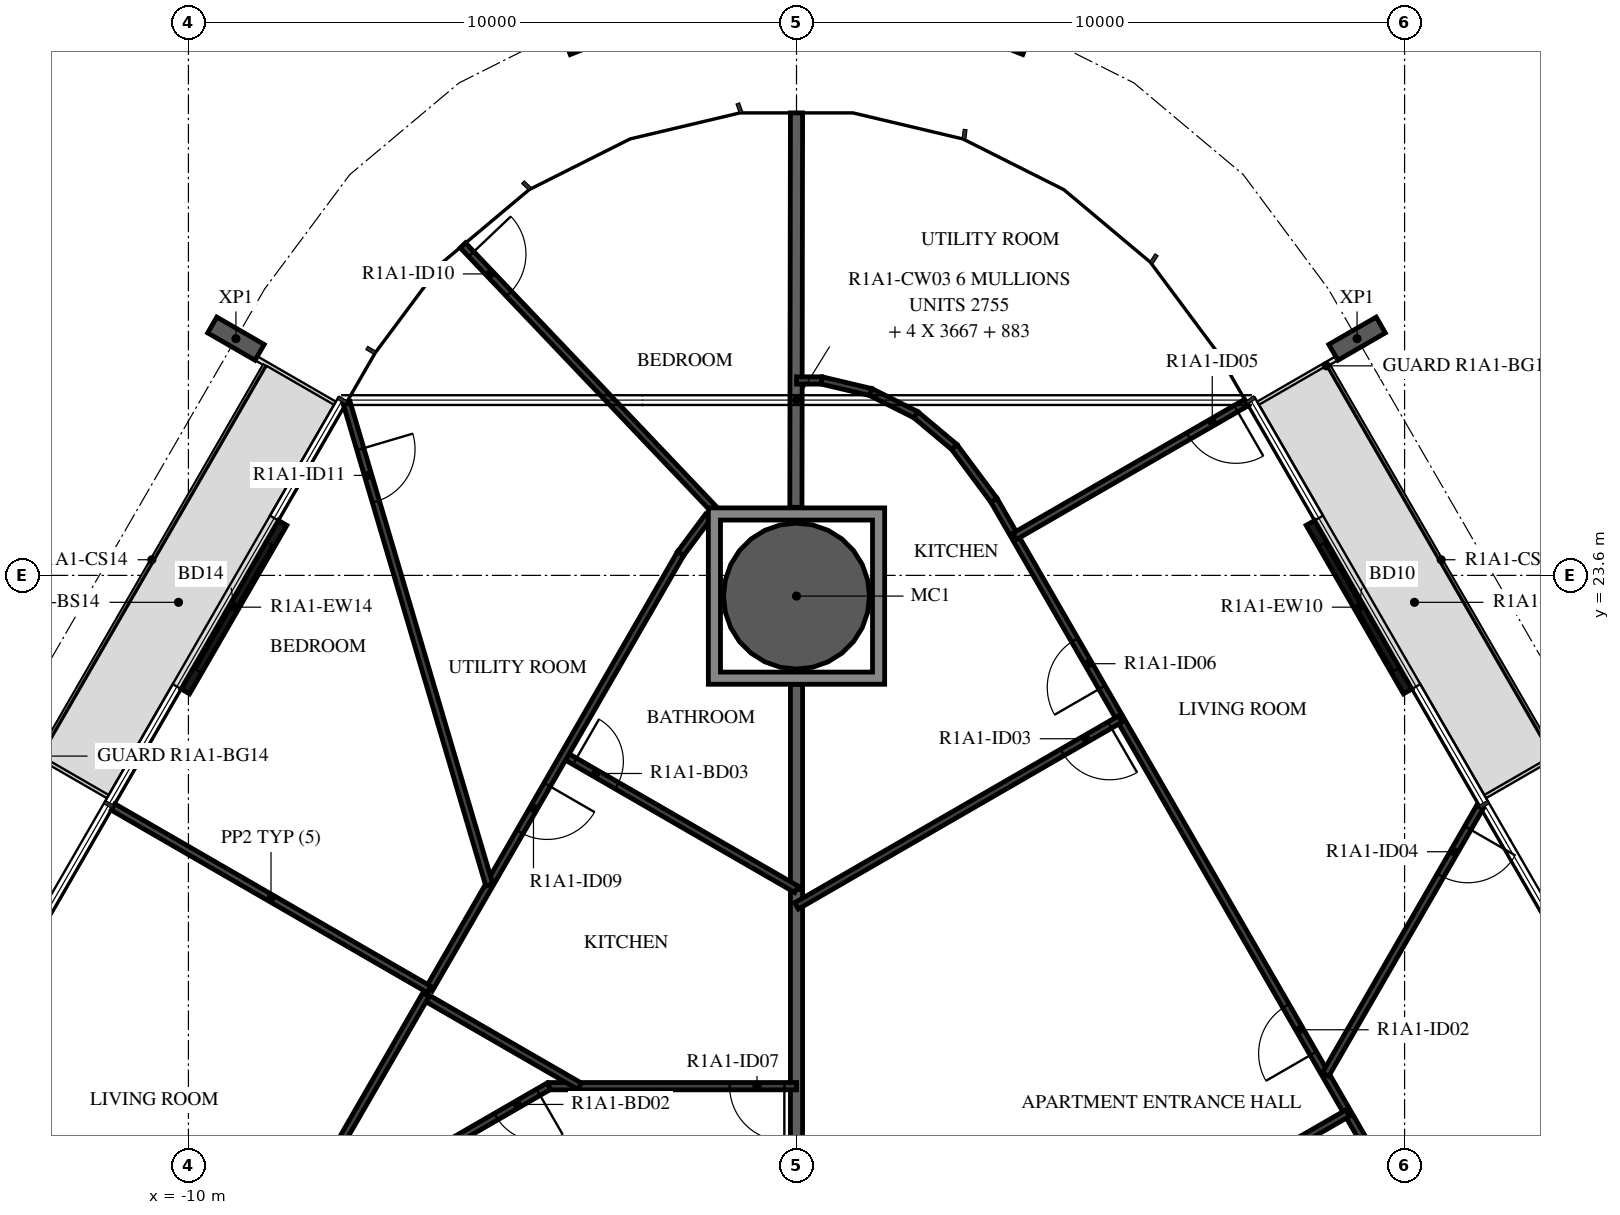
"""IFC4 building model, lengths in metres.
Left out: names, types, materials, properties, quantities, classifications, styles, units other than length and angle.
Written with IfcOpenShell. Run it as: python <this file> out.ifc"""

import sys

from ifc_helpers import new_model, si_unit, direction, frame, frame_2d, origin, origin_2d, place, context, subcontext, project, spatial, polyline, rectangle, hollow_circle, i_section, outline, extrude, element, fill, save


model = new_model("IFC4")
c1 = context("Model", 3, precision=1e-05, world=origin(), true_north=direction((0.0, 1.0)))
c2 = subcontext(c1, "Body", "Model", "MODEL_VIEW")
j1 = project(units=[si_unit("LENGTHUNIT", "METRE"), si_unit("PLANEANGLEUNIT", "RADIAN")], contexts=[c1])
p1 = place(None, origin())
s1 = spatial("IfcSite", under=j1, at=p1, CompositionType="ELEMENT")
p2 = place(p1, origin())
s2 = spatial("IfcBuilding", under=s1, at=p2, CompositionType="ELEMENT")
p3 = place(p2, frame((0.0, 0.0, 41.9)))
s3 = spatial("IfcBuildingStorey", under=s2, at=p3, CompositionType="ELEMENT", Elevation=41.9)
p4 = place(p3, frame((0.0, 23.26, -0.38), z_axis=(0.0, 0.0, 1.0), x_axis=(1.0, 0.0, 0.0)))
e1 = element("IfcColumn", 1, at=p4, inside=s3, PredefinedType="COLUMN", context=c2, shape_type="SweptSolid", body=[
    extrude(hollow_circle(Radius=1.2, WallThickness=0.06, at=origin_2d()), origin(), (0.0, 0.0, 1.0), 3.5),
])
for number, where, z_axis, x_axis in (
    (2, (9.219, 27.493, -0.38), (0.0, 0.0, 1.0), (0.5, -0.866, 0.0)),
    (3, (3.748, 32.639, -0.38), (0.0, 0.0, 1.0), (0.929, -0.371, 0.0)),
    (4, (-3.748, 32.639, -0.38), (0.0, 0.0, 1.0), (0.929, 0.371, 0.0)),
    (5, (-9.219, 27.493, -0.38), (0.0, 0.0, 1.0), (0.5, 0.866, 0.0)),
):
    element("IfcColumn", number, at=place(p3, frame(where, z_axis=z_axis, x_axis=x_axis)), inside=s3, PredefinedType="COLUMN", context=c2, shape_type="SweptSolid", body=[
        extrude(i_section(OverallWidth=0.3, OverallDepth=0.9, WebThickness=0.019, FlangeThickness=0.035, FilletRadius=0.03, at=origin_2d()), origin(), (0.0, 0.0, 1.0), 3.5),
    ])
p5 = place(p3, frame((10.051, 21.692, 0.0), z_axis=(0.0, 0.0, 1.0), x_axis=(-0.499971222258, 0.866042017984, 0.0)))
e6 = element("IfcWall", 6, at=p5, inside=s3, PredefinedType="STANDARD", context=c2, shape_type="SweptSolid", body=[
    extrude(rectangle(XDim=3.2, YDim=0.16, at=frame_2d((1.6, 0.0))), origin(), (0.0, 0.0, 1.0), 3.12),
])
p6 = place(p5, frame((0.4, 0.0, 0.0)))
e7 = element("IfcOpeningElement", 7, at=p6, cuts=e6, PredefinedType="OPENING", context=c2, shape_type="SweptSolid", body=[
    extrude(rectangle(XDim=2.4, YDim=2.4, at=frame_2d((1.2, 1.2))), frame((0.0, 0.09, 0.0), z_axis=(0.0, -1.0, 0.0), x_axis=(1.0, 0.0, 0.0)), (0.0, 0.0, 1.0), 0.18),
])
p7 = place(p3, frame((-8.451, 24.463, 0.0), z_axis=(0.0, 0.0, 1.0), x_axis=(-0.499971222258, -0.866042017984, 0.0)))
e8 = element("IfcWall", 8, at=p7, inside=s3, PredefinedType="STANDARD", context=c2, shape_type="SweptSolid", body=[
    extrude(rectangle(XDim=3.2, YDim=0.16, at=frame_2d((1.6, 0.0))), origin(), (0.0, 0.0, 1.0), 3.12),
])
p8 = place(p7, frame((0.4, 0.0, 0.0)))
e9 = element("IfcOpeningElement", 9, at=p8, cuts=e8, PredefinedType="OPENING", context=c2, shape_type="SweptSolid", body=[
    extrude(rectangle(XDim=2.4, YDim=2.4, at=frame_2d((1.2, 1.2))), frame((0.0, 0.09, 0.0), z_axis=(0.0, -1.0, 0.0), x_axis=(1.0, 0.0, 0.0)), (0.0, 0.0, 1.0), 0.18),
])
p9 = place(p3, frame((0.0, 18.437, 0.0), z_axis=(0.0, 0.0, 1.0), x_axis=(0.0, -1.0, 0.0)))
e10 = element("IfcWall", 10, at=p9, inside=s3, PredefinedType="STANDARD", context=c2, shape_type="SweptSolid", body=[
    extrude(rectangle(XDim=4.737, YDim=0.2, at=frame_2d((2.368, 0.0))), origin(), (0.0, 0.0, 1.0), 3.12),
])
p10 = place(p3, frame((0.0, 31.206, 0.0), z_axis=(0.0, 0.0, 1.0), x_axis=(-0.001543266126, -0.999998809164, 0.0)))
e11 = element("IfcWall", 11, at=p10, inside=s3, PredefinedType="STANDARD", context=c2, shape_type="SweptSolid", body=[
    extrude(rectangle(XDim=6.486, YDim=0.2, at=frame_2d((3.243, 0.0))), origin(), (0.0, 0.0, 1.0), 3.12),
])
p11 = place(p3, frame((0.0, 21.81, 0.0), z_axis=(0.0, 0.0, 1.0), x_axis=(0.0, -1.0, 0.0)))
e12 = element("IfcWall", 12, at=p11, inside=s3, PredefinedType="STANDARD", context=c2, shape_type="SweptSolid", body=[
    extrude(rectangle(XDim=3.373, YDim=0.2, at=frame_2d((1.687, 0.0))), origin(), (0.0, 0.0, 1.0), 3.12),
])
p12 = place(p3, frame((11.139, 11.167, 0.0), z_axis=(0.0, 0.0, 1.0), x_axis=(-0.499994660107, 0.866028486751, 0.0)))
e13 = element("IfcWall", 13, at=p12, inside=s3, PredefinedType="PARTITIONING", context=c2, shape_type="SweptSolid", body=[
    extrude(rectangle(XDim=15.786, YDim=0.12, at=frame_2d((7.893, 0.0))), origin(), (0.0, 0.0, 1.0), 3.12),
])
p13 = place(p12, frame((5.279, 0.0, 0.0)))
e14 = element("IfcOpeningElement", 14, at=p13, cuts=e13, PredefinedType="OPENING", context=c2, shape_type="SweptSolid", body=[
    extrude(rectangle(XDim=0.9, YDim=2.1, at=frame_2d((0.45, 1.05))), frame((0.0, 0.07, 0.0), z_axis=(0.0, -1.0, 0.0), x_axis=(1.0, 0.0, 0.0)), (0.0, 0.0, 1.0), 0.14),
])
p14 = place(p12, frame((12.23, 0.0, 0.0)))
e15 = element("IfcOpeningElement", 15, at=p14, cuts=e13, PredefinedType="OPENING", context=c2, shape_type="SweptSolid", body=[
    extrude(rectangle(XDim=0.9, YDim=2.1, at=frame_2d((0.45, 1.05))), frame((0.0, 0.07, 0.0), z_axis=(0.0, -1.0, 0.0), x_axis=(1.0, 0.0, 0.0)), (0.0, 0.0, 1.0), 0.14),
])
p15 = place(p3, frame((6.952, 13.538, 0.0), z_axis=(0.0, 0.0, 1.0), x_axis=(0.866030657337, 0.49999090047, 0.0)))
e16 = element("IfcWall", 16, at=p15, inside=s3, PredefinedType="PARTITIONING", context=c2, shape_type="SweptSolid", body=[
    extrude(rectangle(XDim=2.44, YDim=0.12, at=frame_2d((1.22, 0.0))), origin(), (0.0, 0.0, 1.0), 3.12),
])
p16 = place(p3, frame((5.324, 21.239, 0.0), z_axis=(0.0, 0.0, 1.0), x_axis=(-0.866030172657, -0.49999173998, 0.0)))
e17 = element("IfcWall", 17, at=p16, inside=s3, PredefinedType="PARTITIONING", context=c2, shape_type="SweptSolid", body=[
    extrude(rectangle(XDim=6.147, YDim=0.12, at=frame_2d((3.074, 0.0))), origin(), (0.0, 0.0, 1.0), 3.12),
])
p17 = place(p16, frame((0.2, 0.0, 0.0)))
e18 = element("IfcOpeningElement", 18, at=p17, cuts=e17, PredefinedType="OPENING", context=c2, shape_type="SweptSolid", body=[
    extrude(rectangle(XDim=0.9, YDim=2.1, at=frame_2d((0.45, 1.05))), frame((0.0, 0.07, 0.0), z_axis=(0.0, -1.0, 0.0), x_axis=(1.0, 0.0, 0.0)), (0.0, 0.0, 1.0), 0.14),
])
p18 = place(p3, frame((11.24, 19.792, 0.0), z_axis=(0.0, 0.0, 1.0), x_axis=(-0.499978956711, -0.866037552792, 0.0)))
e19 = element("IfcWall", 19, at=p18, inside=s3, PredefinedType="PARTITIONING", context=c2, shape_type="SweptSolid", body=[
    extrude(rectangle(XDim=5.081, YDim=0.12, at=frame_2d((2.541, 0.0))), origin(), (0.0, 0.0, 1.0), 3.12),
])
p19 = place(p18, frame((0.4, 0.0, 0.0)))
e20 = element("IfcOpeningElement", 20, at=p19, cuts=e19, PredefinedType="OPENING", context=c2, shape_type="SweptSolid", body=[
    extrude(rectangle(XDim=0.9, YDim=2.1, at=frame_2d((0.45, 1.05))), frame((0.0, 0.07, 0.0), z_axis=(0.0, -1.0, 0.0), x_axis=(1.0, 0.0, 0.0)), (0.0, 0.0, 1.0), 0.14),
])
p20 = place(p3, frame((7.4, 26.443, 0.0), z_axis=(0.0, 0.0, 1.0), x_axis=(-0.866032203192, -0.499988222896, 0.0)))
e21 = element("IfcWall", 21, at=p20, inside=s3, PredefinedType="PARTITIONING", context=c2, shape_type="SweptSolid", body=[
    extrude(rectangle(XDim=4.4, YDim=0.12, at=frame_2d((2.2, 0.0))), origin(), (0.0, 0.0, 1.0), 2.73),
])
p21 = place(p20, frame((0.2, 0.0, 0.0)))
e22 = element("IfcOpeningElement", 22, at=p21, cuts=e21, PredefinedType="OPENING", context=c2, shape_type="SweptSolid", body=[
    extrude(rectangle(XDim=0.9, YDim=2.1, at=frame_2d((0.45, 1.05))), frame((0.0, 0.07, 0.0), z_axis=(0.0, -1.0, 0.0), x_axis=(1.0, 0.0, 0.0)), (0.0, 0.0, 1.0), 0.14),
])
p22 = place(p3, frame((0.0, 26.806, 0.0), z_axis=(0.0, 0.0, 1.0), x_axis=(1.0, 0.0, 0.0)))
e23 = element("IfcWall", 23, at=p22, inside=s3, PredefinedType="PARTITIONING", context=c2, shape_type="SweptSolid", body=[
    extrude(rectangle(XDim=0.415, YDim=0.12, at=frame_2d((0.207, 0.0))), origin(), (0.0, 0.0, 1.0), 3.12),
])
p23 = place(p3, frame((0.415, 26.806, 0.0), z_axis=(0.0, 0.0, 1.0), x_axis=(0.973048993259, -0.230598475097, 0.0)))
e24 = element("IfcWall", 24, at=p23, inside=s3, PredefinedType="PARTITIONING", context=c2, shape_type="SweptSolid", body=[
    extrude(rectangle(XDim=0.829, YDim=0.12, at=frame_2d((0.415, 0.0))), origin(), (0.0, 0.0, 1.0), 3.12),
])
for number, where, z_axis, x_axis in (
    (25, (1.221, 26.615, 0.0), (0.0, 0.0, 1.0), (0.894, -0.449, 0.0)),
    (26, (1.962, 26.243, 0.0), (0.0, 0.0, 1.0), (0.766, -0.643, 0.0)),
):
    element("IfcWall", number, at=place(p3, frame(where, z_axis=z_axis, x_axis=x_axis)), inside=s3, PredefinedType="PARTITIONING", context=c2, shape_type="SweptSolid", body=[
        extrude(rectangle(XDim=0.829, YDim=0.12, at=frame_2d((0.415, 0.0))), origin(), (0.0, 0.0, 1.0), 3.12),
    ])
p24 = place(p3, frame((2.597, 25.71, 0.0), z_axis=(0.0, 0.0, 1.0), x_axis=(0.59722925597, -0.802070580319, 0.0)))
e27 = element("IfcWall", 27, at=p24, inside=s3, PredefinedType="PARTITIONING", context=c2, shape_type="SweptSolid", body=[
    extrude(rectangle(XDim=1.087, YDim=0.12, at=frame_2d((0.543, 0.0))), origin(), (0.0, 0.0, 1.0), 3.12),
])
p25 = place(p3, frame((0.0, 15.2, 0.0), z_axis=(0.0, 0.0, 1.0), x_axis=(-1.0, 0.0, 0.0)))
e28 = element("IfcWall", 28, at=p25, inside=s3, PredefinedType="PARTITIONING", context=c2, shape_type="SweptSolid", body=[
    extrude(rectangle(XDim=4.073, YDim=0.12, at=frame_2d((2.036, 0.0))), origin(), (0.0, 0.0, 1.0), 3.12),
])
p26 = place(p25, frame((0.2, 0.0, 0.0)))
e29 = element("IfcOpeningElement", 29, at=p26, cuts=e28, PredefinedType="OPENING", context=c2, shape_type="SweptSolid", body=[
    extrude(rectangle(XDim=0.9, YDim=2.1, at=frame_2d((0.45, 1.05))), frame((0.0, 0.07, 0.0), z_axis=(0.0, -1.0, 0.0), x_axis=(1.0, 0.0, 0.0)), (0.0, 0.0, 1.0), 0.14),
])
p27 = place(p3, frame((-4.073, 15.2, 0.0), z_axis=(0.0, 0.0, 1.0), x_axis=(-0.866024802457, -0.500001041529, 0.0)))
e30 = element("IfcWall", 30, at=p27, inside=s3, PredefinedType="PARTITIONING", context=c2, shape_type="SweptSolid", body=[
    extrude(rectangle(XDim=6.751, YDim=0.12, at=frame_2d((3.376, 0.0))), origin(), (0.0, 0.0, 1.0), 3.12),
])
p28 = place(p27, frame((0.2, 0.0, 0.0)))
e31 = element("IfcOpeningElement", 31, at=p28, cuts=e30, PredefinedType="OPENING", context=c2, shape_type="SweptSolid", body=[
    extrude(rectangle(XDim=0.8, YDim=2.1, at=frame_2d((0.4, 1.05))), frame((0.0, 0.07, 0.0), z_axis=(0.0, -1.0, 0.0), x_axis=(1.0, 0.0, 0.0)), (0.0, 0.0, 1.0), 0.14),
])
p29 = place(p27, frame((5.206, 0.0, 0.0)))
e32 = element("IfcOpeningElement", 32, at=p29, cuts=e30, PredefinedType="OPENING", context=c2, shape_type="SweptSolid", body=[
    extrude(rectangle(XDim=0.9, YDim=2.1, at=frame_2d((0.45, 1.05))), frame((0.0, 0.07, 0.0), z_axis=(0.0, -1.0, 0.0), x_axis=(1.0, 0.0, 0.0)), (0.0, 0.0, 1.0), 0.14),
])
p30 = place(p3, frame((-5.487, 29.028, 0.0), z_axis=(0.0, 0.0, 1.0), x_axis=(0.689189638576, -0.724581011398, 0.0)))
e33 = element("IfcWall", 33, at=p30, inside=s3, PredefinedType="PARTITIONING", context=c2, shape_type="SweptSolid", body=[
    extrude(rectangle(XDim=5.96, YDim=0.12, at=frame_2d((2.98, 0.0))), origin(), (0.0, 0.0, 1.0), 3.12),
])
p31 = place(p30, frame((0.2, 0.0, 0.0)))
e34 = element("IfcOpeningElement", 34, at=p31, cuts=e33, PredefinedType="OPENING", context=c2, shape_type="SweptSolid", body=[
    extrude(rectangle(XDim=0.9, YDim=2.1, at=frame_2d((0.45, 1.05))), frame((0.0, 0.07, 0.0), z_axis=(0.0, -1.0, 0.0), x_axis=(1.0, 0.0, 0.0)), (0.0, 0.0, 1.0), 0.14),
])
p32 = place(p3, frame((-3.821, 20.643, 0.0), z_axis=(0.0, 0.0, 1.0), x_axis=(0.866024310165, -0.5000018942, 0.0)))
e35 = element("IfcWall", 35, at=p32, inside=s3, PredefinedType="PARTITIONING", context=c2, shape_type="SweptSolid", body=[
    extrude(rectangle(XDim=4.412, YDim=0.12, at=frame_2d((2.206, 0.0))), origin(), (0.0, 0.0, 1.0), 3.12),
])
p33 = place(p32, frame((0.2, 0.0, 0.0)))
e36 = element("IfcOpeningElement", 36, at=p33, cuts=e35, PredefinedType="OPENING", context=c2, shape_type="SweptSolid", body=[
    extrude(rectangle(XDim=0.8, YDim=2.1, at=frame_2d((0.4, 1.05))), frame((0.0, 0.07, 0.0), z_axis=(0.0, -1.0, 0.0), x_axis=(1.0, 0.0, 0.0)), (0.0, 0.0, 1.0), 0.14),
])
p34 = place(p3, frame((-1.45, 24.571, 0.0), z_axis=(0.0, 0.0, 1.0), x_axis=(-0.597187509737, -0.802101663266, 0.0)))
e37 = element("IfcWall", 37, at=p34, inside=s3, PredefinedType="PARTITIONING", context=c2, shape_type="SweptSolid", body=[
    extrude(rectangle(XDim=0.765, YDim=0.12, at=frame_2d((0.382, 0.0))), origin(), (0.0, 0.0, 1.0), 3.12),
])
p35 = place(p3, frame((-1.907, 23.957, 0.0), z_axis=(0.0, 0.0, 1.0), x_axis=(-0.499994901178, -0.866028347571, 0.0)))
e38 = element("IfcWall", 38, at=p35, inside=s3, PredefinedType="PARTITIONING", context=c2, shape_type="SweptSolid", body=[
    extrude(rectangle(XDim=8.274, YDim=0.12, at=frame_2d((4.137, 0.0))), origin(), (0.0, 0.0, 1.0), 3.12),
])
p36 = place(p35, frame((4.387, 0.0, 0.0)))
e39 = element("IfcOpeningElement", 39, at=p36, cuts=e38, PredefinedType="OPENING", context=c2, shape_type="SweptSolid", body=[
    extrude(rectangle(XDim=0.9, YDim=2.1, at=frame_2d((0.45, 1.05))), frame((0.0, 0.07, 0.0), z_axis=(0.0, -1.0, 0.0), x_axis=(1.0, 0.0, 0.0)), (0.0, 0.0, 1.0), 0.14),
])
p37 = place(p3, frame((-6.114, 16.67, 0.0), z_axis=(0.0, 0.0, 1.0), x_axis=(0.866011328839, -0.500024377727, 0.0)))
e40 = element("IfcWall", 40, at=p37, inside=s3, PredefinedType="PARTITIONING", context=c2, shape_type="SweptSolid", body=[
    extrude(rectangle(XDim=2.94, YDim=0.12, at=frame_2d((1.47, 0.0))), origin(), (0.0, 0.0, 1.0), 3.12),
])
p38 = place(p3, frame((-7.4, 26.443, 0.0), z_axis=(0.0, 0.0, 1.0), x_axis=(0.283777867447, -0.95889004685, 0.0)))
e41 = element("IfcWall", 41, at=p38, inside=s3, PredefinedType="PARTITIONING", context=c2, shape_type="SweptSolid", body=[
    extrude(rectangle(XDim=8.274, YDim=0.12, at=frame_2d((4.137, 0.0))), origin(), (0.0, 0.0, 1.0), 3.12),
])
p39 = place(p38, frame((0.8, 0.0, 0.0)))
e42 = element("IfcOpeningElement", 42, at=p39, cuts=e41, PredefinedType="OPENING", context=c2, shape_type="SweptSolid", body=[
    extrude(rectangle(XDim=0.9, YDim=2.1, at=frame_2d((0.45, 1.05))), frame((0.0, 0.07, 0.0), z_axis=(0.0, -1.0, 0.0), x_axis=(1.0, 0.0, 0.0)), (0.0, 0.0, 1.0), 0.14),
])
p40 = place(p3, frame((-11.24, 19.792, 0.0), z_axis=(0.0, 0.0, 1.0), x_axis=(0.866031096941, -0.499990139034, 0.0)))
e43 = element("IfcWall", 43, at=p40, inside=s3, PredefinedType="PARTITIONING", context=c2, shape_type="SweptSolid", body=[
    extrude(rectangle(XDim=6.0, YDim=0.12, at=frame_2d((3.0, 0.0))), origin(), (0.0, 0.0, 1.0), 2.73),
])
p41 = place(p3, frame((-6.094, 16.705, 0.0), z_axis=(0.0, 0.0, 1.0), x_axis=(-0.500014747178, -0.86601688933, 0.0)))
e44 = element("IfcWall", 44, at=p41, inside=s3, PredefinedType="PARTITIONING", context=c2, shape_type="SweptSolid", body=[
    extrude(rectangle(XDim=4.627, YDim=0.12, at=frame_2d((2.313, 0.0))), origin(), (0.0, 0.0, 1.0), 3.12),
])
p42 = place(p3, origin())
e45 = element("IfcWall", 45, at=p42, inside=s3, PredefinedType="STANDARD", context=c2, shape_type="SweptSolid", body=[
    extrude(outline(polyline([(1.45, 24.71), (1.45, 21.81), (-1.45, 21.81), (-1.45, 24.71), (1.45, 24.71)]), holes=[polyline([(-1.25, 22.01), (1.25, 22.01), (1.25, 24.51), (-1.25, 24.51), (-1.25, 22.01)])]), origin(), (0.0, 0.0, 1.0), 3.12),
])
p43 = place(p6, origin())
e46 = element("IfcDoor", 46, at=p43, inside=s3, OperationType="DOUBLE_DOOR_SLIDING", PredefinedType="DOOR", context=c2, shape_type="SweptSolid", body=[
    extrude(rectangle(XDim=2.4, YDim=2.4, at=frame_2d((1.2, 1.2))), frame((0.0, 0.025, 0.0), z_axis=(0.0, -1.0, 0.0), x_axis=(1.0, 0.0, 0.0)), (0.0, 0.0, 1.0), 0.05),
])
fill(e7, e46)
p44 = place(p8, origin())
e47 = element("IfcDoor", 47, at=p44, inside=s3, OperationType="DOUBLE_DOOR_SLIDING", PredefinedType="DOOR", context=c2, shape_type="SweptSolid", body=[
    extrude(rectangle(XDim=2.4, YDim=2.4, at=frame_2d((1.2, 1.2))), frame((0.0, 0.025, 0.0), z_axis=(0.0, -1.0, 0.0), x_axis=(1.0, 0.0, 0.0)), (0.0, 0.0, 1.0), 0.05),
])
fill(e9, e47)
p45 = place(p13, origin())
e48 = element("IfcDoor", 48, at=p45, inside=s3, OperationType="SINGLE_SWING_RIGHT", PredefinedType="DOOR", context=c2, shape_type="SweptSolid", body=[
    extrude(rectangle(XDim=0.9, YDim=2.1, at=frame_2d((0.45, 1.05))), frame((0.0, 0.025, 0.0), z_axis=(0.0, -1.0, 0.0), x_axis=(1.0, 0.0, 0.0)), (0.0, 0.0, 1.0), 0.05),
])
fill(e14, e48)
p46 = place(p17, origin())
e49 = element("IfcDoor", 49, at=p46, inside=s3, OperationType="SINGLE_SWING_RIGHT", PredefinedType="DOOR", context=c2, shape_type="SweptSolid", body=[
    extrude(rectangle(XDim=0.9, YDim=2.1, at=frame_2d((0.45, 1.05))), frame((0.0, 0.025, 0.0), z_axis=(0.0, -1.0, 0.0), x_axis=(1.0, 0.0, 0.0)), (0.0, 0.0, 1.0), 0.05),
])
fill(e18, e49)
p47 = place(p19, origin())
e50 = element("IfcDoor", 50, at=p47, inside=s3, OperationType="SINGLE_SWING_LEFT", PredefinedType="DOOR", context=c2, shape_type="SweptSolid", body=[
    extrude(rectangle(XDim=0.9, YDim=2.1, at=frame_2d((0.45, 1.05))), frame((0.0, 0.025, 0.0), z_axis=(0.0, -1.0, 0.0), x_axis=(1.0, 0.0, 0.0)), (0.0, 0.0, 1.0), 0.05),
])
fill(e20, e50)
p48 = place(p21, origin())
e51 = element("IfcDoor", 51, at=p48, inside=s3, OperationType="SINGLE_SWING_RIGHT", PredefinedType="DOOR", context=c2, shape_type="SweptSolid", body=[
    extrude(rectangle(XDim=0.9, YDim=2.1, at=frame_2d((0.45, 1.05))), frame((0.0, 0.025, 0.0), z_axis=(0.0, -1.0, 0.0), x_axis=(1.0, 0.0, 0.0)), (0.0, 0.0, 1.0), 0.05),
])
fill(e22, e51)
p49 = place(p14, origin())
e52 = element("IfcDoor", 52, at=p49, inside=s3, OperationType="SINGLE_SWING_LEFT", PredefinedType="DOOR", context=c2, shape_type="SweptSolid", body=[
    extrude(rectangle(XDim=0.9, YDim=2.1, at=frame_2d((0.45, 1.05))), frame((0.0, 0.025, 0.0), z_axis=(0.0, -1.0, 0.0), x_axis=(1.0, 0.0, 0.0)), (0.0, 0.0, 1.0), 0.05),
])
fill(e15, e52)
p50 = place(p26, origin())
e53 = element("IfcDoor", 53, at=p50, inside=s3, OperationType="SINGLE_SWING_RIGHT", PredefinedType="DOOR", context=c2, shape_type="SweptSolid", body=[
    extrude(rectangle(XDim=0.9, YDim=2.1, at=frame_2d((0.45, 1.05))), frame((0.0, 0.025, 0.0), z_axis=(0.0, -1.0, 0.0), x_axis=(1.0, 0.0, 0.0)), (0.0, 0.0, 1.0), 0.05),
])
fill(e29, e53)
p51 = place(p28, origin())
e54 = element("IfcDoor", 54, at=p51, inside=s3, OperationType="SINGLE_SWING_LEFT", PredefinedType="DOOR", context=c2, shape_type="SweptSolid", body=[
    extrude(rectangle(XDim=0.8, YDim=2.1, at=frame_2d((0.4, 1.05))), frame((0.0, 0.025, 0.0), z_axis=(0.0, -1.0, 0.0), x_axis=(1.0, 0.0, 0.0)), (0.0, 0.0, 1.0), 0.05),
])
fill(e31, e54)
p52 = place(p33, origin())
e55 = element("IfcDoor", 55, at=p52, inside=s3, OperationType="SINGLE_SWING_LEFT", PredefinedType="DOOR", context=c2, shape_type="SweptSolid", body=[
    extrude(rectangle(XDim=0.8, YDim=2.1, at=frame_2d((0.4, 1.05))), frame((0.0, 0.025, 0.0), z_axis=(0.0, -1.0, 0.0), x_axis=(1.0, 0.0, 0.0)), (0.0, 0.0, 1.0), 0.05),
])
fill(e36, e55)
p53 = place(p36, origin())
e56 = element("IfcDoor", 56, at=p53, inside=s3, OperationType="SINGLE_SWING_LEFT", PredefinedType="DOOR", context=c2, shape_type="SweptSolid", body=[
    extrude(rectangle(XDim=0.9, YDim=2.1, at=frame_2d((0.45, 1.05))), frame((0.0, 0.025, 0.0), z_axis=(0.0, -1.0, 0.0), x_axis=(1.0, 0.0, 0.0)), (0.0, 0.0, 1.0), 0.05),
])
fill(e39, e56)
p54 = place(p31, origin())
e57 = element("IfcDoor", 57, at=p54, inside=s3, OperationType="SINGLE_SWING_LEFT", PredefinedType="DOOR", context=c2, shape_type="SweptSolid", body=[
    extrude(rectangle(XDim=0.9, YDim=2.1, at=frame_2d((0.45, 1.05))), frame((0.0, 0.025, 0.0), z_axis=(0.0, -1.0, 0.0), x_axis=(1.0, 0.0, 0.0)), (0.0, 0.0, 1.0), 0.05),
])
fill(e34, e57)
p55 = place(p39, origin())
e58 = element("IfcDoor", 58, at=p55, inside=s3, OperationType="SINGLE_SWING_RIGHT", PredefinedType="DOOR", context=c2, shape_type="SweptSolid", body=[
    extrude(rectangle(XDim=0.9, YDim=2.1, at=frame_2d((0.45, 1.05))), frame((0.0, 0.025, 0.0), z_axis=(0.0, -1.0, 0.0), x_axis=(1.0, 0.0, 0.0)), (0.0, 0.0, 1.0), 0.05),
])
fill(e42, e58)
save(model, sys.argv[1])
